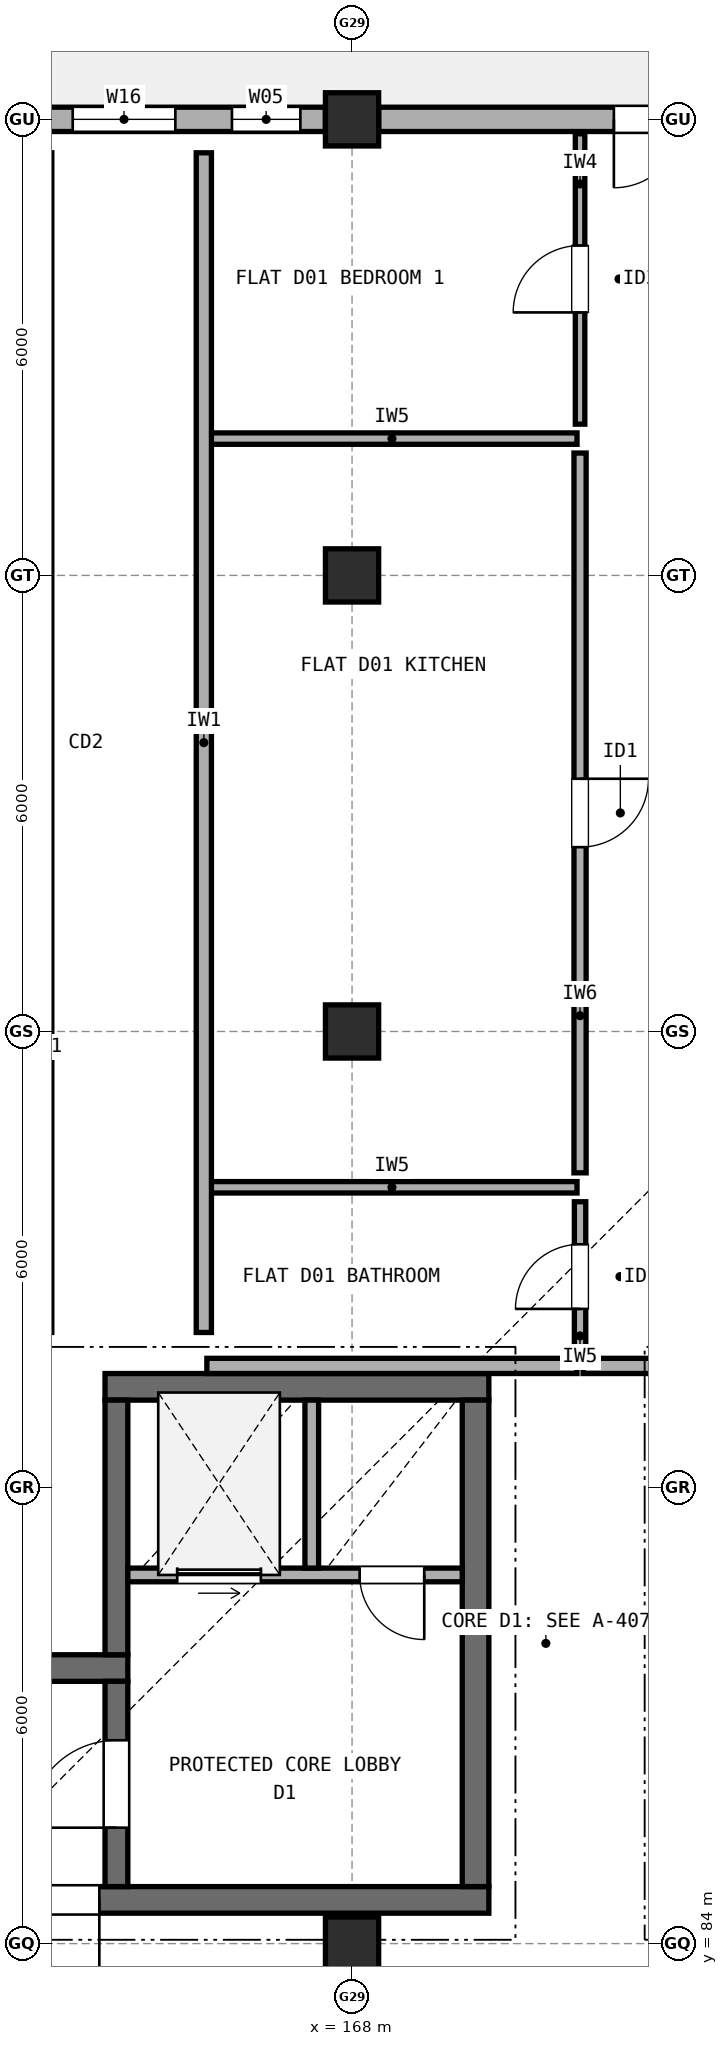
"""IFC4 building model, lengths in metres.
Left out: names, types, materials, properties, quantities, classifications, styles, units other than length and angle.
Written with IfcOpenShell. Run it as: python <this file> out.ifc"""

import sys

from ifc_helpers import new_model, si_unit, direction, frame, frame_2d, origin, origin_2d, place, context, subcontext, project, spatial, rectangle, extrude, element, fill, save


model = new_model("IFC4")
c1 = context("Model", 3, precision=1e-05, world=origin(), true_north=direction((0.0, 1.0)))
c2 = subcontext(c1, "Body", "Model", "MODEL_VIEW")
j1 = project(units=[si_unit("LENGTHUNIT", "METRE"), si_unit("PLANEANGLEUNIT", "RADIAN")], contexts=[c1])
p1 = place(None, origin())
s1 = spatial("IfcSite", under=j1, at=p1, CompositionType="ELEMENT")
p2 = place(p1, origin())
s2 = spatial("IfcBuilding", under=s1, at=p2, CompositionType="ELEMENT")
p3 = place(p2, origin())
s3 = spatial("IfcBuildingStorey", under=s2, at=p3, CompositionType="ELEMENT", Elevation=0.0)
for number, where, z_axis, x_axis in (
    (1, (168.0, 84.0, 0.0), (0.0, 0.0, 1.0), (1.0, 0.0, 0.0)),
    (2, (168.0, 96.0, 0.0), (0.0, 0.0, 1.0), (1.0, 0.0, 0.0)),
    (3, (168.0, 102.0, 0.0), (0.0, 0.0, 1.0), (1.0, 0.0, 0.0)),
    (4, (168.0, 108.0, 0.0), (0.0, 0.0, 1.0), (1.0, 0.0, 0.0)),
):
    element("IfcColumn", number, at=place(p3, frame(where, z_axis=z_axis, x_axis=x_axis)), inside=s3, PredefinedType="COLUMN", context=c2, shape_type="SweptSolid", body=[
        extrude(rectangle(XDim=0.7, YDim=0.7, at=origin_2d()), origin(), (0.0, 0.0, 1.0), 4.23),
    ])
p4 = place(p3, frame((173.65, 108.0, 0.0), z_axis=(0.0, 0.0, 1.0), x_axis=(-1.0, 0.0, 0.0)))
e5 = element("IfcWall", 5, at=p4, inside=s3, PredefinedType="STANDARD", context=c2, shape_type="SweptSolid", body=[
    extrude(rectangle(XDim=5.3, YDim=0.32, at=frame_2d((2.65, 0.0))), origin(), (0.0, 0.0, 1.0), 3.112),
])
p5 = place(p4, frame((0.405, 0.0, 0.0)))
e6 = element("IfcOpeningElement", 6, at=p5, cuts=e5, PredefinedType="OPENING", context=c2, shape_type="SweptSolid", body=[
    extrude(rectangle(XDim=1.8, YDim=2.2, at=frame_2d((0.9, 1.1))), frame((0.0, 0.17, 0.0), z_axis=(0.0, -1.0, 0.0), x_axis=(1.0, 0.0, 0.0)), (0.0, 0.0, 1.0), 0.34),
])
p6 = place(p3, frame((167.65, 108.0, 0.0), z_axis=(0.0, 0.0, 1.0), x_axis=(-1.0, 0.0, 0.0)))
e7 = element("IfcWall", 7, at=p6, inside=s3, PredefinedType="STANDARD", context=c2, shape_type="SweptSolid", body=[
    extrude(rectangle(XDim=5.3, YDim=0.32, at=frame_2d((2.65, 0.0))), origin(), (0.0, 0.0, 1.0), 3.112),
])
p7 = place(p6, frame((0.33, 0.0, 0.9)))
e8 = element("IfcOpeningElement", 8, at=p7, cuts=e7, PredefinedType="OPENING", context=c2, shape_type="SweptSolid", body=[
    extrude(rectangle(XDim=0.9, YDim=1.4, at=frame_2d((0.45, 0.7))), frame((0.0, 0.17, 0.0), z_axis=(0.0, -1.0, 0.0), x_axis=(1.0, 0.0, 0.0)), (0.0, 0.0, 1.0), 0.34),
])
p8 = place(p6, frame((1.975, 0.0, 0.9)))
e9 = element("IfcOpeningElement", 9, at=p8, cuts=e7, PredefinedType="OPENING", context=c2, shape_type="SweptSolid", body=[
    extrude(rectangle(XDim=1.35, YDim=1.5, at=frame_2d((0.675, 0.75))), frame((0.0, 0.17, 0.0), z_axis=(0.0, -1.0, 0.0), x_axis=(1.0, 0.0, 0.0)), (0.0, 0.0, 1.0), 0.34),
])
p9 = place(p6, frame((4.045, 0.0, 0.9)))
e10 = element("IfcOpeningElement", 10, at=p9, cuts=e7, PredefinedType="OPENING", context=c2, shape_type="SweptSolid", body=[
    extrude(rectangle(XDim=0.95, YDim=1.35, at=frame_2d((0.475, 0.675))), frame((0.0, 0.17, 0.0), z_axis=(0.0, -1.0, 0.0), x_axis=(1.0, 0.0, 0.0)), (0.0, 0.0, 1.0), 0.34),
])
p10 = place(p3, frame((158.4, 84.575, 0.0), z_axis=(0.0, 0.0, 1.0), x_axis=(1.0, 0.0, 0.0)))
e11 = element("IfcWall", 11, at=p10, inside=s3, PredefinedType="SHEAR", context=c2, shape_type="SweptSolid", body=[
    extrude(rectangle(XDim=11.4, YDim=0.35, at=frame_2d((5.7, 0.0))), origin(), (0.0, 0.0, 1.0), 4.23),
])
p11 = place(p10, frame((5.125, 0.0, 0.0)))
e12 = element("IfcOpeningElement", 12, at=p11, cuts=e11, PredefinedType="OPENING", context=c2, shape_type="SweptSolid", body=[
    extrude(rectangle(XDim=1.15, YDim=2.15, at=frame_2d((0.575, 1.075))), frame((0.0, 0.185, 0.0), z_axis=(0.0, -1.0, 0.0), x_axis=(1.0, 0.0, 0.0)), (0.0, 0.0, 1.0), 0.37),
])
p12 = place(p3, frame((165.05, 87.625, 0.0), z_axis=(0.0, 0.0, 1.0), x_axis=(-1.0, 0.0, 0.0)))
e13 = element("IfcWall", 13, at=p12, inside=s3, PredefinedType="SHEAR", context=c2, shape_type="SweptSolid", body=[
    extrude(rectangle(XDim=6.65, YDim=0.35, at=frame_2d((3.325, 0.0))), origin(), (0.0, 0.0, 1.0), 4.23),
])
p13 = place(p3, frame((164.9, 84.75, 0.0), z_axis=(0.0, 0.0, 1.0), x_axis=(0.0, 1.0, 0.0)))
e14 = element("IfcWall", 14, at=p13, inside=s3, PredefinedType="SHEAR", context=c2, shape_type="SweptSolid", body=[
    extrude(rectangle(XDim=2.7, YDim=0.3, at=frame_2d((1.35, 0.0))), origin(), (0.0, 0.0, 1.0), 4.23),
])
p14 = place(p13, frame((0.775, 0.0, 0.0)))
e15 = element("IfcOpeningElement", 15, at=p14, cuts=e14, PredefinedType="OPENING", context=c2, shape_type="SweptSolid", body=[
    extrude(rectangle(XDim=1.15, YDim=2.15, at=frame_2d((0.575, 1.075))), frame((0.0, 0.16, 0.0), z_axis=(0.0, -1.0, 0.0), x_axis=(1.0, 0.0, 0.0)), (0.0, 0.0, 1.0), 0.32),
])
p15 = place(p3, frame((169.8, 91.325, 0.0), z_axis=(0.0, 0.0, 1.0), x_axis=(-1.0, 0.0, 0.0)))
e16 = element("IfcWall", 16, at=p15, inside=s3, PredefinedType="SHEAR", context=c2, shape_type="SweptSolid", body=[
    extrude(rectangle(XDim=5.05, YDim=0.35, at=frame_2d((2.525, 0.0))), origin(), (0.0, 0.0, 1.0), 4.23),
])
p16 = place(p3, frame((169.625, 84.75, 0.0), z_axis=(0.0, 0.0, 1.0), x_axis=(0.0, 1.0, 0.0)))
e17 = element("IfcWall", 17, at=p16, inside=s3, PredefinedType="SHEAR", context=c2, shape_type="SweptSolid", body=[
    extrude(rectangle(XDim=6.4, YDim=0.35, at=frame_2d((3.2, 0.0))), origin(), (0.0, 0.0, 1.0), 4.23),
])
p17 = place(p3, frame((164.9, 87.8, 0.0), z_axis=(0.0, 0.0, 1.0), x_axis=(0.0, 1.0, 0.0)))
e18 = element("IfcWall", 18, at=p17, inside=s3, PredefinedType="SHEAR", context=c2, shape_type="SweptSolid", body=[
    extrude(rectangle(XDim=3.35, YDim=0.3, at=frame_2d((1.675, 0.0))), origin(), (0.0, 0.0, 1.0), 4.23),
])
p18 = place(p3, frame((165.05, 88.85, 0.0), z_axis=(0.0, 0.0, 1.0), x_axis=(1.0, 0.0, 0.0)))
e19 = element("IfcWall", 19, at=p18, inside=s3, PredefinedType="SOLIDWALL", context=c2, shape_type="SweptSolid", body=[
    extrude(rectangle(XDim=4.4, YDim=0.18, at=frame_2d((2.2, 0.0))), origin(), (0.0, 0.0, 1.0), 4.23),
])
p19 = place(p18, frame((0.65, 0.0, 0.0)))
e20 = element("IfcOpeningElement", 20, at=p19, cuts=e19, PredefinedType="OPENING", context=c2, shape_type="SweptSolid", body=[
    extrude(rectangle(XDim=1.1, YDim=2.15, at=frame_2d((0.55, 1.075))), frame((0.0, 0.1, 0.0), z_axis=(0.0, -1.0, 0.0), x_axis=(1.0, 0.0, 0.0)), (0.0, 0.0, 1.0), 0.2),
])
p20 = place(p18, frame((3.05, 0.0, 0.0)))
e21 = element("IfcOpeningElement", 21, at=p20, cuts=e19, PredefinedType="OPENING", context=c2, shape_type="SweptSolid", body=[
    extrude(rectangle(XDim=0.85, YDim=2.1, at=frame_2d((0.425, 1.05))), frame((0.0, 0.1, 0.0), z_axis=(0.0, -1.0, 0.0), x_axis=(1.0, 0.0, 0.0)), (0.0, 0.0, 1.0), 0.2),
])
p21 = place(p3, frame((167.47, 88.94, 0.0), z_axis=(0.0, 0.0, 1.0), x_axis=(0.0, 1.0, 0.0)))
e22 = element("IfcWall", 22, at=p21, inside=s3, PredefinedType="SOLIDWALL", context=c2, shape_type="SweptSolid", body=[
    extrude(rectangle(XDim=2.21, YDim=0.18, at=frame_2d((1.105, 0.0))), origin(), (0.0, 0.0, 1.0), 4.23),
])
p22 = place(p3, frame((166.09, 91.6, 0.0), z_axis=(0.0, 0.0, 1.0), x_axis=(1.0, 0.0, 0.0)))
e23 = element("IfcWall", 23, at=p22, inside=s3, PredefinedType="SOLIDWALL", context=c2, shape_type="SweptSolid", body=[
    extrude(rectangle(XDim=4.87, YDim=0.2, at=frame_2d((2.435, 0.0))), origin(), (0.0, 0.0, 1.0), 2.912),
])
p23 = place(p3, frame((171.04, 91.6, 0.0), z_axis=(0.0, 0.0, 1.0), x_axis=(1.0, 0.0, 0.0)))
e24 = element("IfcWall", 24, at=p23, inside=s3, PredefinedType="SOLIDWALL", context=c2, shape_type="SweptSolid", body=[
    extrude(rectangle(XDim=11.92, YDim=0.2, at=frame_2d((5.96, 0.0))), origin(), (0.0, 0.0, 1.0), 4.23),
])
p24 = place(p23, frame((5.47, 0.0, 0.0)))
e25 = element("IfcOpeningElement", 25, at=p24, cuts=e24, PredefinedType="OPENING", context=c2, shape_type="SweptSolid", body=[
    extrude(rectangle(XDim=0.98, YDim=2.15, at=frame_2d((0.49, 1.075))), frame((0.0, 0.11, 0.0), z_axis=(0.0, -1.0, 0.0), x_axis=(1.0, 0.0, 0.0)), (0.0, 0.0, 1.0), 0.22),
])
p25 = place(p3, frame((171.0, 103.99, 0.0), z_axis=(0.0, 0.0, 1.0), x_axis=(0.0, 1.0, 0.0)))
e26 = element("IfcWall", 26, at=p25, inside=s3, PredefinedType="PARTITIONING", context=c2, shape_type="SweptSolid", body=[
    extrude(rectangle(XDim=3.82, YDim=0.125, at=frame_2d((1.91, 0.0))), origin(), (0.0, 0.0, 1.0), 3.112),
])
p26 = place(p25, frame((1.47, 0.0, 0.0)))
e27 = element("IfcOpeningElement", 27, at=p26, cuts=e26, PredefinedType="OPENING", context=c2, shape_type="SweptSolid", body=[
    extrude(rectangle(XDim=0.88, YDim=2.1, at=frame_2d((0.44, 1.05))), frame((0.0, 0.073, 0.0), z_axis=(0.0, -1.0, 0.0), x_axis=(1.0, 0.0, 0.0)), (0.0, 0.0, 1.0), 0.145),
])
p27 = place(p3, frame((171.0, 94.14, 0.0), z_axis=(0.0, 0.0, 1.0), x_axis=(0.0, 1.0, 0.0)))
e28 = element("IfcWall", 28, at=p27, inside=s3, PredefinedType="PLUMBINGWALL", context=c2, shape_type="SweptSolid", body=[
    extrude(rectangle(XDim=9.47, YDim=0.16, at=frame_2d((4.735, 0.0))), origin(), (0.0, 0.0, 1.0), 3.562),
])
p28 = place(p27, frame((4.285, 0.0, 0.0)))
e29 = element("IfcOpeningElement", 29, at=p28, cuts=e28, PredefinedType="OPENING", context=c2, shape_type="SweptSolid", body=[
    extrude(rectangle(XDim=0.9, YDim=2.1, at=frame_2d((0.45, 1.05))), frame((0.0, 0.09, 0.0), z_axis=(0.0, -1.0, 0.0), x_axis=(1.0, 0.0, 0.0)), (0.0, 0.0, 1.0), 0.18),
])
p29 = place(p3, frame((171.0, 91.79, 0.0), z_axis=(0.0, 0.0, 1.0), x_axis=(0.0, 1.0, 0.0)))
e30 = element("IfcWall", 30, at=p29, inside=s3, PredefinedType="PARTITIONING", context=c2, shape_type="SweptSolid", body=[
    extrude(rectangle(XDim=1.97, YDim=0.15, at=frame_2d((0.985, 0.0))), origin(), (0.0, 0.0, 1.0), 4.23),
])
p30 = place(p29, frame((0.56, 0.0, 0.0)))
e31 = element("IfcOpeningElement", 31, at=p30, cuts=e30, PredefinedType="OPENING", context=c2, shape_type="SweptSolid", body=[
    extrude(rectangle(XDim=0.85, YDim=2.1, at=frame_2d((0.425, 1.05))), frame((0.0, 0.085, 0.0), z_axis=(0.0, -1.0, 0.0), x_axis=(1.0, 0.0, 0.0)), (0.0, 0.0, 1.0), 0.17),
])
p31 = place(p3, frame((166.09, 103.8, 0.0), z_axis=(0.0, 0.0, 1.0), x_axis=(1.0, 0.0, 0.0)))
e32 = element("IfcWall", 32, at=p31, inside=s3, PredefinedType="PARTITIONING", context=c2, shape_type="SweptSolid", body=[
    extrude(rectangle(XDim=4.87, YDim=0.15, at=frame_2d((2.435, 0.0))), origin(), (0.0, 0.0, 1.0), 3.612),
])
p32 = place(p3, frame((166.09, 93.95, 0.0), z_axis=(0.0, 0.0, 1.0), x_axis=(1.0, 0.0, 0.0)))
e33 = element("IfcWall", 33, at=p32, inside=s3, PredefinedType="PARTITIONING", context=c2, shape_type="SweptSolid", body=[
    extrude(rectangle(XDim=4.87, YDim=0.15, at=frame_2d((2.435, 0.0))), origin(), (0.0, 0.0, 1.0), 2.912),
])
p33 = place(p3, frame((166.05, 92.04, 0.0), z_axis=(0.0, 0.0, 1.0), x_axis=(0.0, 1.0, 0.0)))
e34 = element("IfcWall", 34, at=p33, inside=s3, PredefinedType="SOLIDWALL", context=c2, shape_type="SweptSolid", body=[
    extrude(rectangle(XDim=15.52, YDim=0.2, at=frame_2d((7.76, 0.0))), origin(), (0.0, 0.0, 1.0), 3.562),
])
p34 = place(p5, frame((1.8, 0.0, 0.0), z_axis=(0.0, 0.0, 1.0), x_axis=(-1.0, 0.0, 0.0)))
e35 = element("IfcDoor", 35, at=p34, inside=s3, OperationType="DOUBLE_DOOR_SINGLE_SWING", PredefinedType="DOOR", context=c2, shape_type="SweptSolid", body=[
    extrude(rectangle(XDim=1.8, YDim=2.2, at=frame_2d((0.9, 1.1))), frame((0.0, 0.025, 0.0), z_axis=(0.0, -1.0, 0.0), x_axis=(1.0, 0.0, 0.0)), (0.0, 0.0, 1.0), 0.05),
])
fill(e6, e35)
p35 = place(p7, origin())
e36 = element("IfcWindow", 36, at=p35, inside=s3, PartitioningType="SINGLE_PANEL", PredefinedType="WINDOW", context=c2, shape_type="SweptSolid", body=[
    extrude(rectangle(XDim=0.9, YDim=1.4, at=frame_2d((0.45, 0.7))), frame((0.0, 0.03, 0.0), z_axis=(0.0, -1.0, 0.0), x_axis=(1.0, 0.0, 0.0)), (0.0, 0.0, 1.0), 0.06),
])
fill(e8, e36)
p36 = place(p8, origin())
e37 = element("IfcWindow", 37, at=p36, inside=s3, PartitioningType="SINGLE_PANEL", PredefinedType="WINDOW", context=c2, shape_type="SweptSolid", body=[
    extrude(rectangle(XDim=1.35, YDim=1.5, at=frame_2d((0.675, 0.75))), frame((0.0, 0.03, 0.0), z_axis=(0.0, -1.0, 0.0), x_axis=(1.0, 0.0, 0.0)), (0.0, 0.0, 1.0), 0.06),
])
fill(e9, e37)
p37 = place(p11, origin())
e38 = element("IfcDoor", 38, at=p37, inside=s3, OperationType="SINGLE_SWING_RIGHT", PredefinedType="DOOR", context=c2, shape_type="SweptSolid", body=[
    extrude(rectangle(XDim=1.15, YDim=2.15, at=frame_2d((0.575, 1.075))), frame((0.0, 0.025, 0.0), z_axis=(0.0, -1.0, 0.0), x_axis=(1.0, 0.0, 0.0)), (0.0, 0.0, 1.0), 0.05),
])
fill(e12, e38)
p38 = place(p14, origin())
e39 = element("IfcDoor", 39, at=p38, inside=s3, OperationType="SINGLE_SWING_LEFT", PredefinedType="DOOR", context=c2, shape_type="SweptSolid", body=[
    extrude(rectangle(XDim=1.15, YDim=2.15, at=frame_2d((0.575, 1.075))), frame((0.0, 0.025, 0.0), z_axis=(0.0, -1.0, 0.0), x_axis=(1.0, 0.0, 0.0)), (0.0, 0.0, 1.0), 0.05),
])
fill(e15, e39)
p39 = place(p19, origin())
e40 = element("IfcDoor", 40, at=p39, inside=s3, OperationType="SLIDING_TO_LEFT", PredefinedType="DOOR", context=c2, shape_type="SweptSolid", body=[
    extrude(rectangle(XDim=1.1, YDim=2.15, at=frame_2d((0.55, 1.075))), frame((0.0, 0.025, 0.0), z_axis=(0.0, -1.0, 0.0), x_axis=(1.0, 0.0, 0.0)), (0.0, 0.0, 1.0), 0.05),
])
fill(e20, e40)
p40 = place(p20, frame((0.85, 0.0, 0.0), z_axis=(0.0, 0.0, 1.0), x_axis=(-1.0, 0.0, 0.0)))
e41 = element("IfcDoor", 41, at=p40, inside=s3, OperationType="SINGLE_SWING_RIGHT", PredefinedType="DOOR", context=c2, shape_type="SweptSolid", body=[
    extrude(rectangle(XDim=0.85, YDim=2.1, at=frame_2d((0.425, 1.05))), frame((0.0, 0.025, 0.0), z_axis=(0.0, -1.0, 0.0), x_axis=(1.0, 0.0, 0.0)), (0.0, 0.0, 1.0), 0.05),
])
fill(e21, e41)
p41 = place(p26, origin())
e42 = element("IfcDoor", 42, at=p41, inside=s3, OperationType="SINGLE_SWING_LEFT", PredefinedType="DOOR", context=c2, shape_type="SweptSolid", body=[
    extrude(rectangle(XDim=0.88, YDim=2.1, at=frame_2d((0.44, 1.05))), frame((0.0, 0.025, 0.0), z_axis=(0.0, -1.0, 0.0), x_axis=(1.0, 0.0, 0.0)), (0.0, 0.0, 1.0), 0.05),
])
fill(e27, e42)
p42 = place(p28, origin())
e43 = element("IfcDoor", 43, at=p42, inside=s3, OperationType="SINGLE_SWING_RIGHT", PredefinedType="DOOR", context=c2, shape_type="SweptSolid", body=[
    extrude(rectangle(XDim=0.9, YDim=2.1, at=frame_2d((0.45, 1.05))), frame((0.0, 0.025, 0.0), z_axis=(0.0, -1.0, 0.0), x_axis=(1.0, 0.0, 0.0)), (0.0, 0.0, 1.0), 0.05),
])
fill(e29, e43)
p43 = place(p30, origin())
e44 = element("IfcDoor", 44, at=p43, inside=s3, OperationType="SINGLE_SWING_LEFT", PredefinedType="DOOR", context=c2, shape_type="SweptSolid", body=[
    extrude(rectangle(XDim=0.85, YDim=2.1, at=frame_2d((0.425, 1.05))), frame((0.0, 0.025, 0.0), z_axis=(0.0, -1.0, 0.0), x_axis=(1.0, 0.0, 0.0)), (0.0, 0.0, 1.0), 0.05),
])
fill(e31, e44)
save(model, sys.argv[1])
